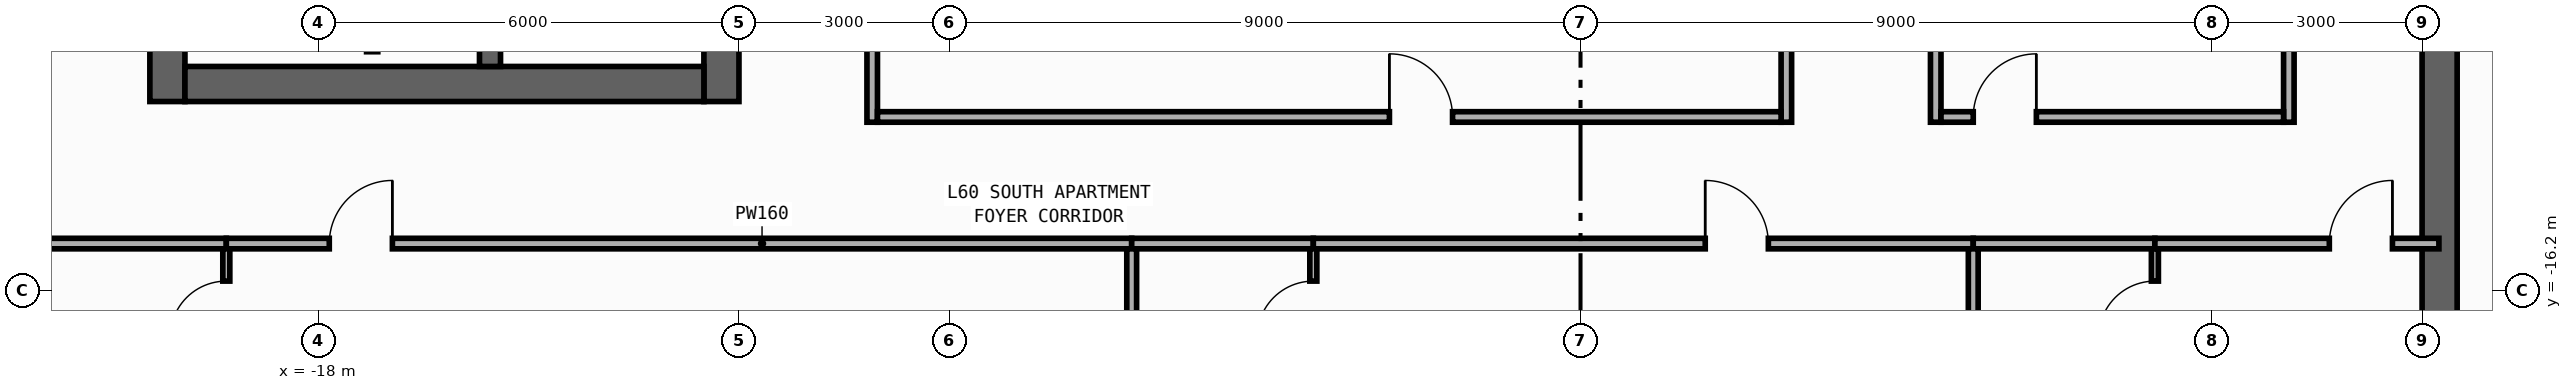
"""IFC4 building model, lengths in metres.
Left out: names, types, materials, properties, quantities, classifications, styles, units other than length and angle.
Written with IfcOpenShell. Run it as: python <this file> out.ifc"""

import sys

from ifc_helpers import new_model, si_unit, direction, frame, frame_2d, origin, place, context, subcontext, project, spatial, rectangle, extrude, element, fill, save


model = new_model("IFC4")
c1 = context("Model", 3, precision=1e-05, world=origin(), true_north=direction((0.0, 1.0)))
c2 = subcontext(c1, "Body", "Model", "MODEL_VIEW")
j1 = project(units=[si_unit("LENGTHUNIT", "METRE"), si_unit("PLANEANGLEUNIT", "RADIAN")], contexts=[c1])
p1 = place(None, origin())
s1 = spatial("IfcSite", under=j1, at=p1, CompositionType="ELEMENT")
p2 = place(p1, origin())
s2 = spatial("IfcBuilding", under=s1, at=p2, CompositionType="ELEMENT")
p3 = place(p2, frame((0.0, 0.0, 254.8)))
s3 = spatial("IfcBuildingStorey", under=s2, at=p3, CompositionType="ELEMENT", Elevation=254.8)
p4 = place(p3, frame((-20.15, -13.5, 0.0), z_axis=(0.0, 0.0, 1.0), x_axis=(0.0, 1.0, 0.0)))
e1 = element("IfcWall", 1, at=p4, inside=s3, PredefinedType="SHEAR", context=c2, shape_type="SweptSolid", body=[
    extrude(rectangle(XDim=27.0, YDim=0.5, at=frame_2d((13.5, 0.0))), origin(), (0.0, 0.0, 1.0), 3.34),
])
p5 = place(p3, frame((-12.25, -13.5, 0.0), z_axis=(0.0, 0.0, 1.0), x_axis=(0.0, 1.0, 0.0)))
e2 = element("IfcWall", 2, at=p5, inside=s3, PredefinedType="SHEAR", context=c2, shape_type="SweptSolid", body=[
    extrude(rectangle(XDim=27.0, YDim=0.5, at=frame_2d((13.5, 0.0))), origin(), (0.0, 0.0, 1.0), 3.34),
])
p6 = place(p5, frame((15.175, 0.0, 0.0)))
e3 = element("IfcOpeningElement", 3, at=p6, cuts=e2, PredefinedType="OPENING", context=c2, shape_type="SweptSolid", body=[
    extrude(rectangle(XDim=0.85, YDim=2.1, at=frame_2d((0.425, 1.05))), frame((0.0, 0.26, 0.0), z_axis=(0.0, -1.0, 0.0), x_axis=(1.0, 0.0, 0.0)), (0.0, 0.0, 1.0), 0.52),
])
p7 = place(p5, frame((21.275, 0.0, 0.0)))
e4 = element("IfcOpeningElement", 4, at=p7, cuts=e2, PredefinedType="OPENING", context=c2, shape_type="SweptSolid", body=[
    extrude(rectangle(XDim=0.85, YDim=2.1, at=frame_2d((0.425, 1.05))), frame((0.0, 0.26, 0.0), z_axis=(0.0, -1.0, 0.0), x_axis=(1.0, 0.0, 0.0)), (0.0, 0.0, 1.0), 0.52),
])
p8 = place(p5, frame((4.275, 0.0, 0.0)))
e5 = element("IfcOpeningElement", 5, at=p8, cuts=e2, PredefinedType="OPENING", context=c2, shape_type="SweptSolid", body=[
    extrude(rectangle(XDim=0.85, YDim=2.1, at=frame_2d((0.425, 1.05))), frame((0.0, 0.26, 0.0), z_axis=(0.0, -1.0, 0.0), x_axis=(1.0, 0.0, 0.0)), (0.0, 0.0, 1.0), 0.52),
])
p9 = place(p5, frame((10.275, 0.0, 0.0)))
e6 = element("IfcOpeningElement", 6, at=p9, cuts=e2, PredefinedType="OPENING", context=c2, shape_type="SweptSolid", body=[
    extrude(rectangle(XDim=0.85, YDim=2.1, at=frame_2d((0.425, 1.05))), frame((0.0, 0.26, 0.0), z_axis=(0.0, -1.0, 0.0), x_axis=(1.0, 0.0, 0.0)), (0.0, 0.0, 1.0), 0.52),
])
p10 = place(p5, frame((12.725, 0.0, 0.0)))
e7 = element("IfcOpeningElement", 7, at=p10, cuts=e2, PredefinedType="OPENING", context=c2, shape_type="SweptSolid", body=[
    extrude(rectangle(XDim=1.15, YDim=2.2, at=frame_2d((0.575, 1.1))), frame((0.0, 0.26, 0.0), z_axis=(0.0, -1.0, 0.0), x_axis=(1.0, 0.0, 0.0)), (0.0, 0.0, 1.0), 0.52),
])
p11 = place(p5, frame((1.625, 0.0, 0.0)))
e8 = element("IfcOpeningElement", 8, at=p11, cuts=e2, PredefinedType="OPENING", context=c2, shape_type="SweptSolid", body=[
    extrude(rectangle(XDim=0.85, YDim=2.1, at=frame_2d((0.425, 1.05))), frame((0.0, 0.26, 0.0), z_axis=(0.0, -1.0, 0.0), x_axis=(1.0, 0.0, 0.0)), (0.0, 0.0, 1.0), 0.52),
])
p12 = place(p3, frame((-19.9, -13.25, 0.0), z_axis=(0.0, 0.0, 1.0), x_axis=(1.0, 0.0, 0.0)))
e9 = element("IfcWall", 9, at=p12, inside=s3, PredefinedType="SHEAR", context=c2, shape_type="SweptSolid", body=[
    extrude(rectangle(XDim=7.4, YDim=0.5, at=frame_2d((3.7, 0.0))), origin(), (0.0, 0.0, 1.0), 3.34),
])
p13 = place(p3, frame((-15.55, -13.0, 0.0), z_axis=(0.0, 0.0, 1.0), x_axis=(0.0, 1.0, 0.0)))
e10 = element("IfcWall", 10, at=p13, inside=s3, PredefinedType="SHEAR", context=c2, shape_type="SweptSolid", body=[
    extrude(rectangle(XDim=26.0, YDim=0.3, at=frame_2d((13.0, 0.0))), origin(), (0.0, 0.0, 1.0), 3.34),
])
p14 = place(p13, frame((12.225, 0.0, 0.0)))
e11 = element("IfcOpeningElement", 11, at=p14, cuts=e10, PredefinedType="OPENING", context=c2, shape_type="SweptSolid", body=[
    extrude(rectangle(XDim=1.15, YDim=2.2, at=frame_2d((0.575, 1.1))), frame((0.0, 0.16, 0.0), z_axis=(0.0, -1.0, 0.0), x_axis=(1.0, 0.0, 0.0)), (0.0, 0.0, 1.0), 0.32),
])
p15 = place(p13, frame((1.125, 0.0, 0.0)))
e12 = element("IfcOpeningElement", 12, at=p15, cuts=e10, PredefinedType="OPENING", context=c2, shape_type="SweptSolid", body=[
    extrude(rectangle(XDim=0.85, YDim=2.1, at=frame_2d((0.425, 1.05))), frame((0.0, 0.16, 0.0), z_axis=(0.0, -1.0, 0.0), x_axis=(1.0, 0.0, 0.0)), (0.0, 0.0, 1.0), 0.32),
])
p16 = place(p3, frame((12.25, -19.8, 0.0), z_axis=(0.0, 0.0, 1.0), x_axis=(0.0, 1.0, 0.0)))
e13 = element("IfcWall", 13, at=p16, inside=s3, PredefinedType="SHEAR", context=c2, shape_type="SweptSolid", body=[
    extrude(rectangle(XDim=27.0, YDim=0.5, at=frame_2d((13.5, 0.0))), origin(), (0.0, 0.0, 1.0), 3.34),
])
p17 = place(p16, frame((23.05, 0.0, 0.0)))
e14 = element("IfcOpeningElement", 14, at=p17, cuts=e13, PredefinedType="OPENING", context=c2, shape_type="SweptSolid", body=[
    extrude(rectangle(XDim=1.1, YDim=2.2, at=frame_2d((0.55, 1.1))), frame((0.0, 0.26, 0.0), z_axis=(0.0, -1.0, 0.0), x_axis=(1.0, 0.0, 0.0)), (0.0, 0.0, 1.0), 0.52),
])
p18 = place(p16, frame((19.85, 0.0, 0.0)))
e15 = element("IfcOpeningElement", 15, at=p18, cuts=e13, PredefinedType="OPENING", context=c2, shape_type="SweptSolid", body=[
    extrude(rectangle(XDim=1.1, YDim=2.2, at=frame_2d((0.55, 1.1))), frame((0.0, 0.26, 0.0), z_axis=(0.0, -1.0, 0.0), x_axis=(1.0, 0.0, 0.0)), (0.0, 0.0, 1.0), 0.52),
])
p19 = place(p16, frame((16.65, 0.0, 0.0)))
e16 = element("IfcOpeningElement", 16, at=p19, cuts=e13, PredefinedType="OPENING", context=c2, shape_type="SweptSolid", body=[
    extrude(rectangle(XDim=1.1, YDim=2.2, at=frame_2d((0.55, 1.1))), frame((0.0, 0.26, 0.0), z_axis=(0.0, -1.0, 0.0), x_axis=(1.0, 0.0, 0.0)), (0.0, 0.0, 1.0), 0.52),
])
p20 = place(p16, frame((7.175, 0.0, 0.0)))
e17 = element("IfcOpeningElement", 17, at=p20, cuts=e13, PredefinedType="OPENING", context=c2, shape_type="SweptSolid", body=[
    extrude(rectangle(XDim=0.85, YDim=2.1, at=frame_2d((0.425, 1.05))), frame((0.0, 0.26, 0.0), z_axis=(0.0, -1.0, 0.0), x_axis=(1.0, 0.0, 0.0)), (0.0, 0.0, 1.0), 0.52),
])
p21 = place(p16, frame((10.375, 0.0, 0.0)))
e18 = element("IfcOpeningElement", 18, at=p21, cuts=e13, PredefinedType="OPENING", context=c2, shape_type="SweptSolid", body=[
    extrude(rectangle(XDim=0.85, YDim=2.1, at=frame_2d((0.425, 1.05))), frame((0.0, 0.26, 0.0), z_axis=(0.0, -1.0, 0.0), x_axis=(1.0, 0.0, 0.0)), (0.0, 0.0, 1.0), 0.52),
])
p22 = place(p16, frame((12.725, 0.0, 0.0)))
e19 = element("IfcOpeningElement", 19, at=p22, cuts=e13, PredefinedType="OPENING", context=c2, shape_type="SweptSolid", body=[
    extrude(rectangle(XDim=1.15, YDim=2.2, at=frame_2d((0.575, 1.1))), frame((0.0, 0.26, 0.0), z_axis=(0.0, -1.0, 0.0), x_axis=(1.0, 0.0, 0.0)), (0.0, 0.0, 1.0), 0.52),
])
p23 = place(p16, frame((25.125, 0.0, 0.0)))
e20 = element("IfcOpeningElement", 20, at=p23, cuts=e13, PredefinedType="OPENING", context=c2, shape_type="SweptSolid", body=[
    extrude(rectangle(XDim=0.85, YDim=2.1, at=frame_2d((0.425, 1.05))), frame((0.0, 0.26, 0.0), z_axis=(0.0, -1.0, 0.0), x_axis=(1.0, 0.0, 0.0)), (0.0, 0.0, 1.0), 0.52),
])
p24 = place(p3, frame((-10.1, -13.795, 0.0), z_axis=(0.0, 0.0, 1.0), x_axis=(0.0, 1.0, 0.0)))
e21 = element("IfcWall", 21, at=p24, inside=s3, PredefinedType="PARTITIONING", context=c2, shape_type="SweptSolid", body=[
    extrude(rectangle(XDim=16.605, YDim=0.15, at=frame_2d((8.302, 0.0))), origin(), (0.0, 0.0, 1.0), 3.34),
])
p25 = place(p24, frame((7.954, 0.0, 0.0)))
e22 = element("IfcOpeningElement", 22, at=p25, cuts=e21, PredefinedType="OPENING", context=c2, shape_type="SweptSolid", body=[
    extrude(rectangle(XDim=0.9, YDim=2.15, at=frame_2d((0.45, 1.075))), frame((0.0, 0.085, 0.0), z_axis=(0.0, -1.0, 0.0), x_axis=(1.0, 0.0, 0.0)), (0.0, 0.0, 1.0), 0.17),
])
p26 = place(p3, frame((10.1, -13.795, 0.0), z_axis=(0.0, 0.0, 1.0), x_axis=(0.0, 1.0, 0.0)))
e23 = element("IfcWall", 23, at=p26, inside=s3, PredefinedType="PARTITIONING", context=c2, shape_type="SweptSolid", body=[
    extrude(rectangle(XDim=13.975, YDim=0.15, at=frame_2d((6.987, 0.0))), origin(), (0.0, 0.0, 1.0), 3.34),
])
p27 = place(p26, frame((7.956, 0.0, 0.0)))
e24 = element("IfcOpeningElement", 24, at=p27, cuts=e23, PredefinedType="OPENING", context=c2, shape_type="SweptSolid", body=[
    extrude(rectangle(XDim=0.9, YDim=2.15, at=frame_2d((0.45, 1.075))), frame((0.0, 0.085, 0.0), z_axis=(0.0, -1.0, 0.0), x_axis=(1.0, 0.0, 0.0)), (0.0, 0.0, 1.0), 0.17),
])
p28 = place(p3, frame((2.935, -13.795, 0.0), z_axis=(0.0, 0.0, 1.0), x_axis=(0.0, 1.0, 0.0)))
e25 = element("IfcWall", 25, at=p28, inside=s3, PredefinedType="PARTITIONING", context=c2, shape_type="SweptSolid", body=[
    extrude(rectangle(XDim=16.455, YDim=0.15, at=frame_2d((8.228, 0.0))), origin(), (0.0, 0.0, 1.0), 3.34),
])
p29 = place(p28, frame((7.878, 0.0, 0.0)))
e26 = element("IfcOpeningElement", 26, at=p29, cuts=e25, PredefinedType="OPENING", context=c2, shape_type="SweptSolid", body=[
    extrude(rectangle(XDim=0.9, YDim=2.15, at=frame_2d((0.45, 1.075))), frame((0.0, 0.085, 0.0), z_axis=(0.0, -1.0, 0.0), x_axis=(1.0, 0.0, 0.0)), (0.0, 0.0, 1.0), 0.17),
])
p30 = place(p3, frame((5.065, -13.795, 0.0), z_axis=(0.0, 0.0, 1.0), x_axis=(0.0, 1.0, 0.0)))
e27 = element("IfcWall", 27, at=p30, inside=s3, PredefinedType="PARTITIONING", context=c2, shape_type="SweptSolid", body=[
    extrude(rectangle(XDim=13.815, YDim=0.15, at=frame_2d((6.907, 0.0))), origin(), (0.0, 0.0, 1.0), 2.99),
])
p31 = place(p30, frame((7.982, 0.0, 0.0)))
e28 = element("IfcOpeningElement", 28, at=p31, cuts=e27, PredefinedType="OPENING", context=c2, shape_type="SweptSolid", body=[
    extrude(rectangle(XDim=0.9, YDim=2.15, at=frame_2d((0.45, 1.075))), frame((0.0, 0.085, 0.0), z_axis=(0.0, -1.0, 0.0), x_axis=(1.0, 0.0, 0.0)), (0.0, 0.0, 1.0), 0.17),
])
p32 = place(p3, frame((-21.955, -15.525, 0.0), z_axis=(0.0, 0.0, 1.0), x_axis=(1.0, 0.0, 0.0)))
e29 = element("IfcWall", 29, at=p32, inside=s3, PredefinedType="PARTITIONING", context=c2, shape_type="SweptSolid", body=[
    extrude(rectangle(XDim=2.645, YDim=0.15, at=frame_2d((1.323, 0.0))), origin(), (0.0, 0.0, 1.0), 3.34),
])
p33 = place(p3, frame((-19.31, -15.525, 0.0), z_axis=(0.0, 0.0, 1.0), x_axis=(1.0, 0.0, 0.0)))
e30 = element("IfcWall", 30, at=p33, inside=s3, PredefinedType="PARTITIONING", context=c2, shape_type="SweptSolid", body=[
    extrude(rectangle(XDim=12.91, YDim=0.15, at=frame_2d((6.455, 0.0))), origin(), (0.0, 0.0, 1.0), 3.34),
])
p34 = place(p33, frame((1.468, 0.0, 0.0)))
e31 = element("IfcOpeningElement", 31, at=p34, cuts=e30, PredefinedType="OPENING", context=c2, shape_type="SweptSolid", body=[
    extrude(rectangle(XDim=0.9, YDim=2.15, at=frame_2d((0.45, 1.075))), frame((0.0, 0.085, 0.0), z_axis=(0.0, -1.0, 0.0), x_axis=(1.0, 0.0, 0.0)), (0.0, 0.0, 1.0), 0.17),
])
p35 = place(p3, frame((-6.4, -15.525, 0.0), z_axis=(0.0, 0.0, 1.0), x_axis=(1.0, 0.0, 0.0)))
e32 = element("IfcWall", 32, at=p35, inside=s3, PredefinedType="PARTITIONING", context=c2, shape_type="SweptSolid", body=[
    extrude(rectangle(XDim=2.59, YDim=0.15, at=frame_2d((1.295, 0.0))), origin(), (0.0, 0.0, 1.0), 3.34),
])
p36 = place(p3, frame((-3.81, -15.525, 0.0), z_axis=(0.0, 0.0, 1.0), x_axis=(1.0, 0.0, 0.0)))
e33 = element("IfcWall", 33, at=p36, inside=s3, PredefinedType="PARTITIONING", context=c2, shape_type="SweptSolid", body=[
    extrude(rectangle(XDim=9.41, YDim=0.15, at=frame_2d((4.705, 0.0))), origin(), (0.0, 0.0, 1.0), 3.34),
])
p37 = place(p36, frame((5.588, 0.0, 0.0)))
e34 = element("IfcOpeningElement", 34, at=p37, cuts=e33, PredefinedType="OPENING", context=c2, shape_type="SweptSolid", body=[
    extrude(rectangle(XDim=0.9, YDim=2.15, at=frame_2d((0.45, 1.075))), frame((0.0, 0.085, 0.0), z_axis=(0.0, -1.0, 0.0), x_axis=(1.0, 0.0, 0.0)), (0.0, 0.0, 1.0), 0.17),
])
p38 = place(p3, frame((5.6, -15.525, 0.0), z_axis=(0.0, 0.0, 1.0), x_axis=(1.0, 0.0, 0.0)))
e35 = element("IfcWall", 35, at=p38, inside=s3, PredefinedType="PARTITIONING", context=c2, shape_type="SweptSolid", body=[
    extrude(rectangle(XDim=2.59, YDim=0.15, at=frame_2d((1.295, 0.0))), origin(), (0.0, 0.0, 1.0), 3.34),
])
p39 = place(p3, frame((8.19, -15.525, 0.0), z_axis=(0.0, 0.0, 1.0), x_axis=(1.0, 0.0, 0.0)))
e36 = element("IfcWall", 36, at=p39, inside=s3, PredefinedType="PARTITIONING", context=c2, shape_type="SweptSolid", body=[
    extrude(rectangle(XDim=4.05, YDim=0.15, at=frame_2d((2.025, 0.0))), origin(), (0.0, 0.0, 1.0), 3.34),
])
p40 = place(p39, frame((2.487, 0.0, 0.0)))
e37 = element("IfcOpeningElement", 37, at=p40, cuts=e36, PredefinedType="OPENING", context=c2, shape_type="SweptSolid", body=[
    extrude(rectangle(XDim=0.9, YDim=2.15, at=frame_2d((0.45, 1.075))), frame((0.0, 0.085, 0.0), z_axis=(0.0, -1.0, 0.0), x_axis=(1.0, 0.0, 0.0)), (0.0, 0.0, 1.0), 0.17),
])
p41 = place(p3, frame((-10.025, -13.72, 0.0), z_axis=(0.0, 0.0, 1.0), x_axis=(1.0, 0.0, 0.0)))
e38 = element("IfcWall", 38, at=p41, inside=s3, PredefinedType="PARTITIONING", context=c2, shape_type="SweptSolid", body=[
    extrude(rectangle(XDim=12.885, YDim=0.15, at=frame_2d((6.442, 0.0))), origin(), (0.0, 0.0, 1.0), 3.34),
])
p42 = place(p41, frame((7.3, 0.0, 0.0)))
e39 = element("IfcOpeningElement", 39, at=p42, cuts=e38, PredefinedType="OPENING", context=c2, shape_type="SweptSolid", body=[
    extrude(rectangle(XDim=0.9, YDim=2.15, at=frame_2d((0.45, 1.075))), frame((0.0, 0.085, 0.0), z_axis=(0.0, -1.0, 0.0), x_axis=(1.0, 0.0, 0.0)), (0.0, 0.0, 1.0), 0.17),
])
p43 = place(p3, frame((5.14, -13.72, 0.0), z_axis=(0.0, 0.0, 1.0), x_axis=(1.0, 0.0, 0.0)))
e40 = element("IfcWall", 40, at=p43, inside=s3, PredefinedType="PARTITIONING", context=c2, shape_type="SweptSolid", body=[
    extrude(rectangle(XDim=4.885, YDim=0.15, at=frame_2d((2.442, 0.0))), origin(), (0.0, 0.0, 1.0), 3.34),
])
p44 = place(p43, frame((0.46, 0.0, 0.0)))
e41 = element("IfcOpeningElement", 41, at=p44, cuts=e40, PredefinedType="OPENING", context=c2, shape_type="SweptSolid", body=[
    extrude(rectangle(XDim=0.9, YDim=2.15, at=frame_2d((0.45, 1.075))), frame((0.0, 0.085, 0.0), z_axis=(0.0, -1.0, 0.0), x_axis=(1.0, 0.0, 0.0)), (0.0, 0.0, 1.0), 0.17),
])
p45 = place(p3, frame((-19.31, -18.1, 0.0), z_axis=(0.0, 0.0, 1.0), x_axis=(0.0, 1.0, 0.0)))
e42 = element("IfcWall", 42, at=p45, inside=s3, PredefinedType="PARTITIONING", context=c2, shape_type="SweptSolid", body=[
    extrude(rectangle(XDim=2.5, YDim=0.1, at=frame_2d((1.25, 0.0))), origin(), (0.0, 0.0, 1.0), 3.34),
])
p46 = place(p45, frame((1.24, 0.0, 0.0)))
e43 = element("IfcOpeningElement", 43, at=p46, cuts=e42, PredefinedType="OPENING", context=c2, shape_type="SweptSolid", body=[
    extrude(rectangle(XDim=0.8, YDim=2.1, at=frame_2d((0.4, 1.05))), frame((0.0, 0.06, 0.0), z_axis=(0.0, -1.0, 0.0), x_axis=(1.0, 0.0, 0.0)), (0.0, 0.0, 1.0), 0.12),
])
p47 = place(p3, frame((-6.4, -18.1, 0.0), z_axis=(0.0, 0.0, 1.0), x_axis=(0.0, 1.0, 0.0)))
e44 = element("IfcWall", 44, at=p47, inside=s3, PredefinedType="PARTITIONING", context=c2, shape_type="SweptSolid", body=[
    extrude(rectangle(XDim=2.5, YDim=0.14, at=frame_2d((1.25, 0.0))), origin(), (0.0, 0.0, 1.0), 3.34),
])
p48 = place(p3, frame((-3.81, -18.1, 0.0), z_axis=(0.0, 0.0, 1.0), x_axis=(0.0, 1.0, 0.0)))
e45 = element("IfcWall", 45, at=p48, inside=s3, PredefinedType="PARTITIONING", context=c2, shape_type="SweptSolid", body=[
    extrude(rectangle(XDim=2.5, YDim=0.1, at=frame_2d((1.25, 0.0))), origin(), (0.0, 0.0, 1.0), 3.34),
])
p49 = place(p48, frame((1.24, 0.0, 0.0)))
e46 = element("IfcOpeningElement", 46, at=p49, cuts=e45, PredefinedType="OPENING", context=c2, shape_type="SweptSolid", body=[
    extrude(rectangle(XDim=0.8, YDim=2.1, at=frame_2d((0.4, 1.05))), frame((0.0, 0.06, 0.0), z_axis=(0.0, -1.0, 0.0), x_axis=(1.0, 0.0, 0.0)), (0.0, 0.0, 1.0), 0.12),
])
p50 = place(p3, frame((5.6, -18.1, 0.0), z_axis=(0.0, 0.0, 1.0), x_axis=(0.0, 1.0, 0.0)))
e47 = element("IfcWall", 47, at=p50, inside=s3, PredefinedType="PARTITIONING", context=c2, shape_type="SweptSolid", body=[
    extrude(rectangle(XDim=2.5, YDim=0.14, at=frame_2d((1.25, 0.0))), origin(), (0.0, 0.0, 1.0), 3.34),
])
p51 = place(p3, frame((8.19, -18.1, 0.0), z_axis=(0.0, 0.0, 1.0), x_axis=(0.0, 1.0, 0.0)))
e48 = element("IfcWall", 48, at=p51, inside=s3, PredefinedType="PARTITIONING", context=c2, shape_type="SweptSolid", body=[
    extrude(rectangle(XDim=2.5, YDim=0.1, at=frame_2d((1.25, 0.0))), origin(), (0.0, 0.0, 1.0), 3.34),
])
p52 = place(p51, frame((1.24, 0.0, 0.0)))
e49 = element("IfcOpeningElement", 49, at=p52, cuts=e48, PredefinedType="OPENING", context=c2, shape_type="SweptSolid", body=[
    extrude(rectangle(XDim=0.8, YDim=2.1, at=frame_2d((0.4, 1.05))), frame((0.0, 0.06, 0.0), z_axis=(0.0, -1.0, 0.0), x_axis=(1.0, 0.0, 0.0)), (0.0, 0.0, 1.0), 0.12),
])
p53 = place(p34, origin())
e50 = element("IfcDoor", 50, at=p53, inside=s3, OperationType="SINGLE_SWING_RIGHT", PredefinedType="DOOR", context=c2, shape_type="SweptSolid", body=[
    extrude(rectangle(XDim=0.9, YDim=2.15, at=frame_2d((0.45, 1.075))), frame((0.0, 0.025, 0.0), z_axis=(0.0, -1.0, 0.0), x_axis=(1.0, 0.0, 0.0)), (0.0, 0.0, 1.0), 0.05),
])
fill(e31, e50)
p54 = place(p37, origin())
e51 = element("IfcDoor", 51, at=p54, inside=s3, OperationType="SINGLE_SWING_LEFT", PredefinedType="DOOR", context=c2, shape_type="SweptSolid", body=[
    extrude(rectangle(XDim=0.9, YDim=2.15, at=frame_2d((0.45, 1.075))), frame((0.0, 0.025, 0.0), z_axis=(0.0, -1.0, 0.0), x_axis=(1.0, 0.0, 0.0)), (0.0, 0.0, 1.0), 0.05),
])
fill(e34, e51)
p55 = place(p40, origin())
e52 = element("IfcDoor", 52, at=p55, inside=s3, OperationType="SINGLE_SWING_RIGHT", PredefinedType="DOOR", context=c2, shape_type="SweptSolid", body=[
    extrude(rectangle(XDim=0.9, YDim=2.15, at=frame_2d((0.45, 1.075))), frame((0.0, 0.025, 0.0), z_axis=(0.0, -1.0, 0.0), x_axis=(1.0, 0.0, 0.0)), (0.0, 0.0, 1.0), 0.05),
])
fill(e37, e52)
p56 = place(p42, origin())
e53 = element("IfcDoor", 53, at=p56, inside=s3, OperationType="SINGLE_SWING_LEFT", PredefinedType="DOOR", context=c2, shape_type="SweptSolid", body=[
    extrude(rectangle(XDim=0.9, YDim=2.15, at=frame_2d((0.45, 1.075))), frame((0.0, 0.025, 0.0), z_axis=(0.0, -1.0, 0.0), x_axis=(1.0, 0.0, 0.0)), (0.0, 0.0, 1.0), 0.05),
])
fill(e39, e53)
p57 = place(p44, origin())
e54 = element("IfcDoor", 54, at=p57, inside=s3, OperationType="SINGLE_SWING_RIGHT", PredefinedType="DOOR", context=c2, shape_type="SweptSolid", body=[
    extrude(rectangle(XDim=0.9, YDim=2.15, at=frame_2d((0.45, 1.075))), frame((0.0, 0.025, 0.0), z_axis=(0.0, -1.0, 0.0), x_axis=(1.0, 0.0, 0.0)), (0.0, 0.0, 1.0), 0.05),
])
fill(e41, e54)
p58 = place(p46, origin())
e55 = element("IfcDoor", 55, at=p58, inside=s3, OperationType="SINGLE_SWING_LEFT", PredefinedType="DOOR", context=c2, shape_type="SweptSolid", body=[
    extrude(rectangle(XDim=0.8, YDim=2.1, at=frame_2d((0.4, 1.05))), frame((0.0, 0.025, 0.0), z_axis=(0.0, -1.0, 0.0), x_axis=(1.0, 0.0, 0.0)), (0.0, 0.0, 1.0), 0.05),
])
fill(e43, e55)
p59 = place(p49, origin())
e56 = element("IfcDoor", 56, at=p59, inside=s3, OperationType="SINGLE_SWING_LEFT", PredefinedType="DOOR", context=c2, shape_type="SweptSolid", body=[
    extrude(rectangle(XDim=0.8, YDim=2.1, at=frame_2d((0.4, 1.05))), frame((0.0, 0.025, 0.0), z_axis=(0.0, -1.0, 0.0), x_axis=(1.0, 0.0, 0.0)), (0.0, 0.0, 1.0), 0.05),
])
fill(e46, e56)
p60 = place(p52, origin())
e57 = element("IfcDoor", 57, at=p60, inside=s3, OperationType="SINGLE_SWING_LEFT", PredefinedType="DOOR", context=c2, shape_type="SweptSolid", body=[
    extrude(rectangle(XDim=0.8, YDim=2.1, at=frame_2d((0.4, 1.05))), frame((0.0, 0.025, 0.0), z_axis=(0.0, -1.0, 0.0), x_axis=(1.0, 0.0, 0.0)), (0.0, 0.0, 1.0), 0.05),
])
fill(e49, e57)
save(model, sys.argv[1])
